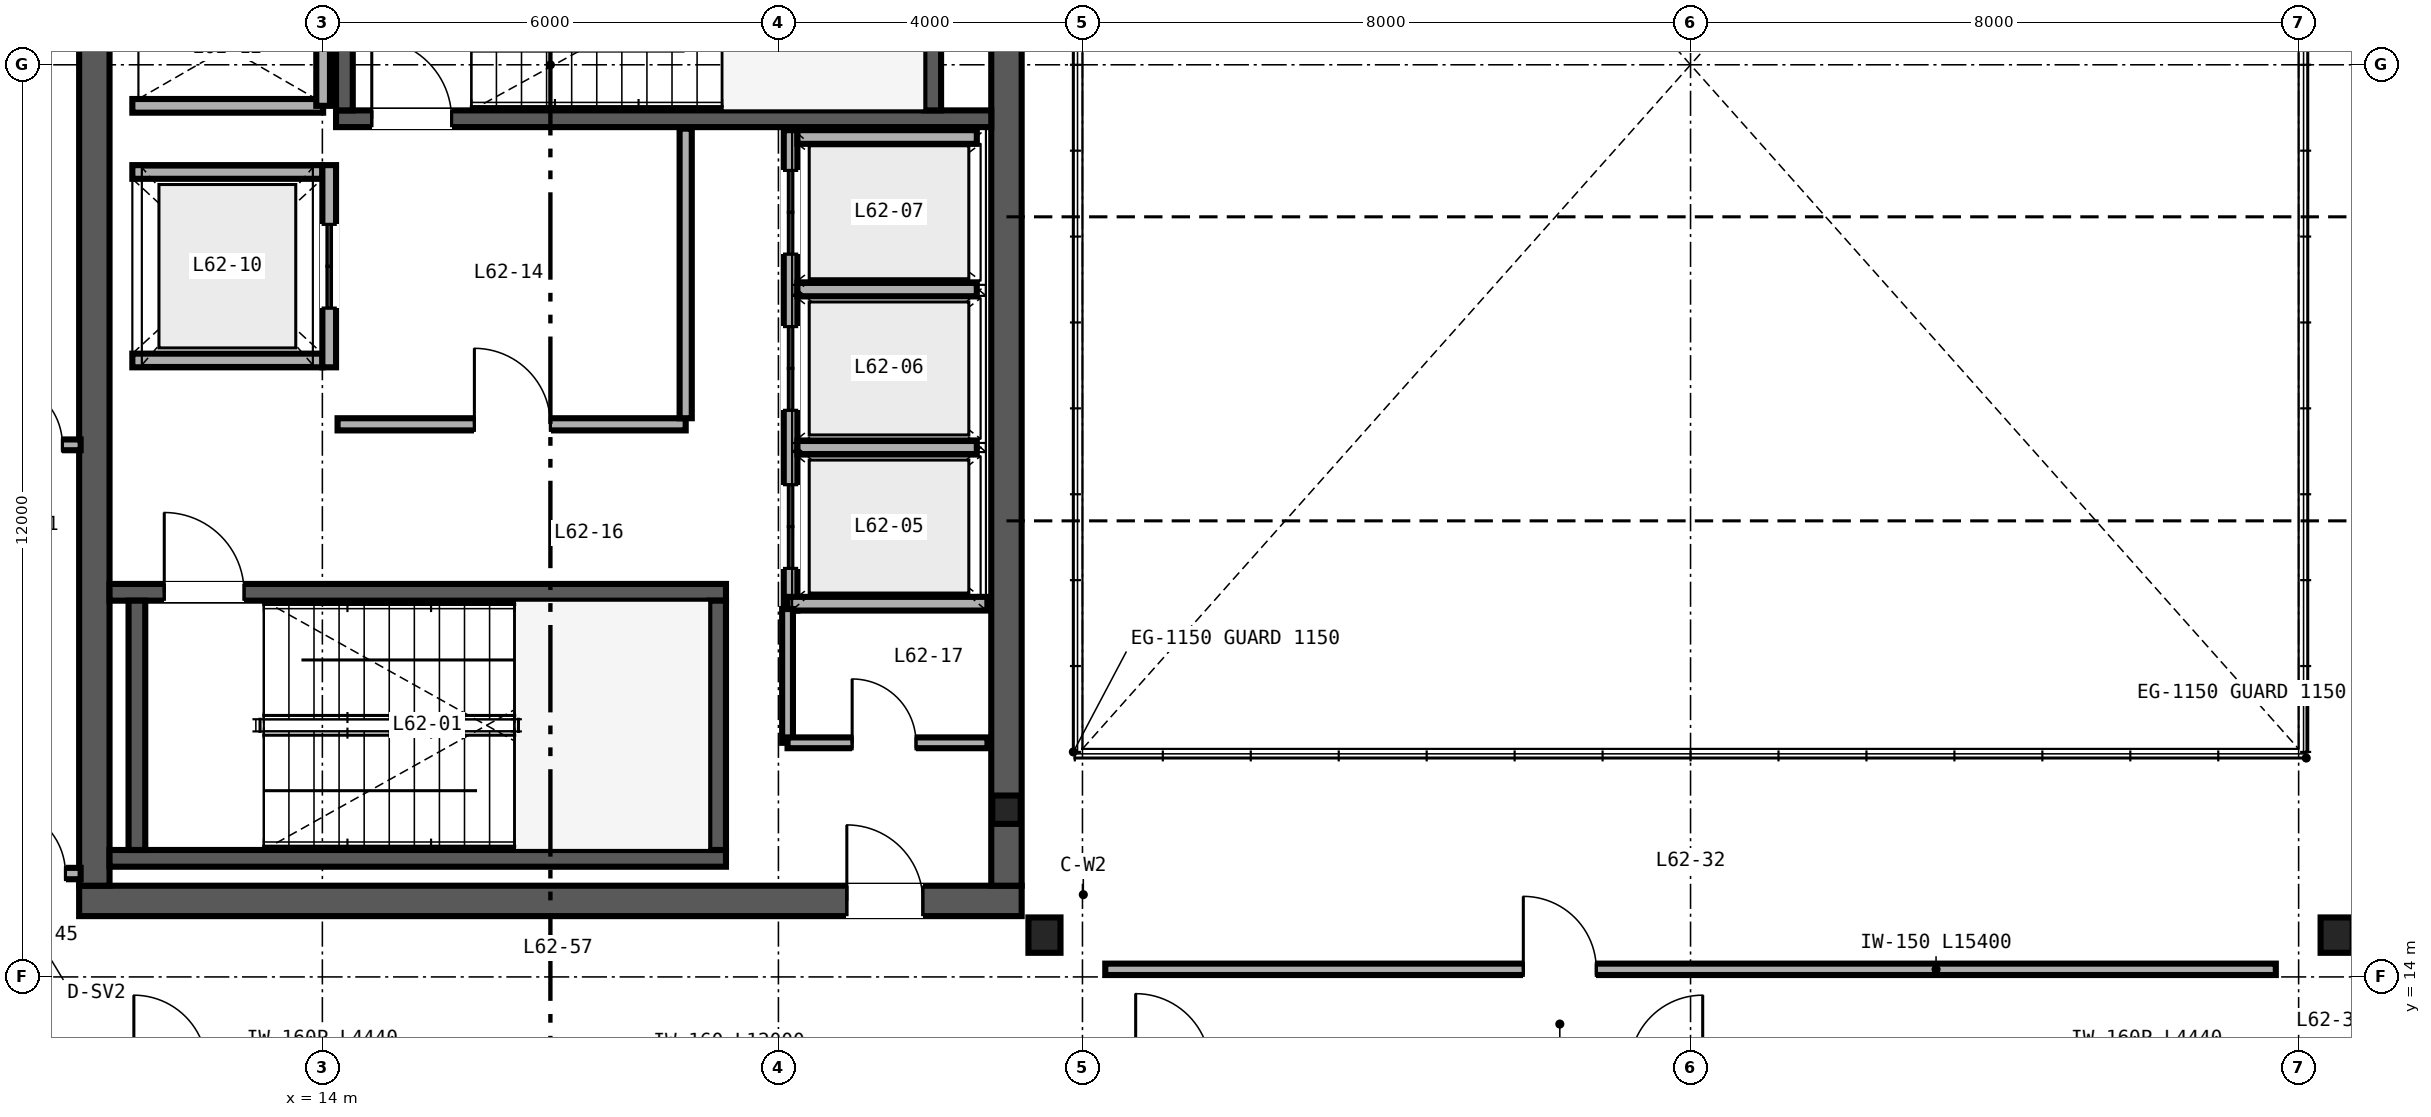
"""IFC4 building model, lengths in metres.
Left out: names, types, materials, properties, quantities, classifications, styles, units other than length and angle.
Written with IfcOpenShell. Run it as: python <this file> out.ifc"""

import sys

from ifc_helpers import new_model, si_unit, direction, frame, frame_2d, origin, origin_2d, place, context, subcontext, project, spatial, rectangle, i_section, extrude, source, transform, mapped, element, fill, save


model = new_model("IFC4")
c1 = context("Model", 3, precision=1e-05, world=origin(), true_north=direction((0.0, 1.0)))
c2 = subcontext(c1, "Body", "Model", "MODEL_VIEW")
j1 = project(units=[si_unit("LENGTHUNIT", "METRE"), si_unit("PLANEANGLEUNIT", "RADIAN")], contexts=[c1])
p1 = place(None, origin())
s1 = spatial("IfcSite", under=j1, at=p1, CompositionType="ELEMENT")
p2 = place(p1, origin())
s2 = spatial("IfcBuilding", under=s1, at=p2, CompositionType="ELEMENT")
p3 = place(p2, frame((0.0, 0.0, 247.2)))
s3 = spatial("IfcBuildingStorey", under=s2, at=p3, CompositionType="ELEMENT", Elevation=247.2)
m1 = source(origin(), c2, "Body", "SweptSolid", [
    extrude(i_section(OverallWidth=0.374, OverallDepth=0.373, WebThickness=0.016, FlangeThickness=0.026, FilletRadius=0.025, at=origin_2d()), origin(), (0.0, 0.0, 1.0), 3.6),
])
p4 = place(p3, frame((23.0, 16.2, 0.0), z_axis=(0.0, 0.0, 1.0), x_axis=(1.0, 0.0, 0.0)))
e1 = element("IfcColumn", 1, at=p4, inside=s3, PredefinedType="COLUMN", context=c2, shape_type="MappedRepresentation", body=[
    mapped(m1, transform((0.0, 0.0, 0.0), scale=1.0)),
])
p5 = place(p3, frame((10.8, 15.0, 0.0), z_axis=(0.0, 0.0, 1.0), x_axis=(1.0, 0.0, 0.0)))
e2 = element("IfcWall", 2, at=p5, inside=s3, PredefinedType="SHEAR", context=c2, shape_type="SweptSolid", body=[
    extrude(rectangle(XDim=12.4, YDim=0.4, at=frame_2d((6.2, 0.0))), origin(), (0.0, 0.0, 1.0), 3.38),
])
p6 = place(p5, frame((10.1, 0.0, 0.0)))
e3 = element("IfcOpeningElement", 3, at=p6, cuts=e2, PredefinedType="OPENING", context=c2, shape_type="SweptSolid", body=[
    extrude(rectangle(XDim=1.0, YDim=2.15, at=frame_2d((0.5, 1.075))), frame((0.0, 0.21, 0.0), z_axis=(0.0, -1.0, 0.0), x_axis=(1.0, 0.0, 0.0)), (0.0, 0.0, 1.0), 0.42),
])
for number, where, z_axis, x_axis in (
    (4, (11.0, 15.2, 0.0), (0.0, 0.0, 1.0), (0.0, 1.0, 0.0)),
    (5, (23.0, 15.2, 0.0), (0.0, 0.0, 1.0), (0.0, 1.0, 0.0)),
):
    element("IfcWall", number, at=place(p3, frame(where, z_axis=z_axis, x_axis=x_axis)), inside=s3, PredefinedType="SHEAR", context=c2, shape_type="SweptSolid", body=[
        extrude(rectangle(XDim=21.6, YDim=0.4, at=frame_2d((10.8, 0.0))), origin(), (0.0, 0.0, 1.0), 3.38),
    ])
p7 = place(p3, frame((11.2, 15.56, 0.0), z_axis=(0.0, 0.0, 1.0), x_axis=(1.0, 0.0, 0.0)))
e6 = element("IfcWall", 6, at=p7, inside=s3, PredefinedType="SHEAR", context=c2, shape_type="SweptSolid", body=[
    extrude(rectangle(XDim=8.11, YDim=0.22, at=frame_2d((4.055, 0.0))), origin(), (0.0, 0.0, 1.0), 3.4),
])
p8 = place(p3, frame((11.2, 19.06, 0.0), z_axis=(0.0, 0.0, 1.0), x_axis=(1.0, 0.0, 0.0)))
e7 = element("IfcWall", 7, at=p8, inside=s3, PredefinedType="SHEAR", context=c2, shape_type="SweptSolid", body=[
    extrude(rectangle(XDim=8.11, YDim=0.22, at=frame_2d((4.055, 0.0))), origin(), (0.0, 0.0, 1.0), 3.4),
])
p9 = place(p8, frame((0.72, 0.0, 0.0)))
e8 = element("IfcOpeningElement", 8, at=p9, cuts=e7, PredefinedType="OPENING", context=c2, shape_type="SweptSolid", body=[
    extrude(rectangle(XDim=1.05, YDim=2.15, at=frame_2d((0.525, 1.075))), frame((0.0, 0.12, 0.0), z_axis=(0.0, -1.0, 0.0), x_axis=(1.0, 0.0, 0.0)), (0.0, 0.0, 1.0), 0.24),
])
for number, where, z_axis, x_axis in (
    (9, (11.56, 15.67, 0.0), (0.0, 0.0, 1.0), (0.0, 1.0, 0.0)),
    (10, (19.2, 15.67, 0.0), (0.0, 0.0, 1.0), (0.0, 1.0, 0.0)),
):
    element("IfcWall", number, at=place(p3, frame(where, z_axis=z_axis, x_axis=x_axis)), inside=s3, PredefinedType="SHEAR", context=c2, shape_type="SweptSolid", body=[
        extrude(rectangle(XDim=3.28, YDim=0.22, at=frame_2d((1.64, 0.0))), origin(), (0.0, 0.0, 1.0), 3.4),
    ])
p10 = place(p3, frame((14.18, 25.29, 0.0), z_axis=(0.0, 0.0, 1.0), x_axis=(1.0, 0.0, 0.0)))
e11 = element("IfcWall", 11, at=p10, inside=s3, PredefinedType="SHEAR", context=c2, shape_type="SweptSolid", body=[
    extrude(rectangle(XDim=8.62, YDim=0.22, at=frame_2d((4.31, 0.0))), origin(), (0.0, 0.0, 1.0), 3.4),
])
p11 = place(p10, frame((0.47, 0.0, 0.0)))
e12 = element("IfcOpeningElement", 12, at=p11, cuts=e11, PredefinedType="OPENING", context=c2, shape_type="SweptSolid", body=[
    extrude(rectangle(XDim=1.05, YDim=2.15, at=frame_2d((0.525, 1.075))), frame((0.0, 0.12, 0.0), z_axis=(0.0, -1.0, 0.0), x_axis=(1.0, 0.0, 0.0)), (0.0, 0.0, 1.0), 0.24),
])
for number, where, z_axis, x_axis in (
    (13, (14.29, 25.4, 0.0), (0.0, 0.0, 1.0), (0.0, 1.0, 0.0)),
    (14, (22.03, 25.4, 0.0), (0.0, 0.0, 1.0), (0.0, 1.0, 0.0)),
):
    element("IfcWall", number, at=place(p3, frame(where, z_axis=z_axis, x_axis=x_axis)), inside=s3, PredefinedType="SHEAR", context=c2, shape_type="SweptSolid", body=[
        extrude(rectangle(XDim=3.28, YDim=0.22, at=frame_2d((1.64, 0.0))), origin(), (0.0, 0.0, 1.0), 3.4),
    ])
m2 = source(origin(), c2, "Body", "SweptSolid", [
    extrude(i_section(OverallWidth=0.422, OverallDepth=0.465, WebThickness=0.045, FlangeThickness=0.073, FilletRadius=0.025, at=origin_2d()), origin(), (0.0, 0.0, 1.0), 3.38),
])
for number, where, z_axis, x_axis in (
    (15, (23.5, 14.55, 0.0), (0.0, 0.0, 1.0), (1.0, 0.0, 0.0)),
    (16, (40.5, 14.55, 0.0), (0.0, 0.0, 1.0), (1.0, 0.0, 0.0)),
):
    element("IfcColumn", number, at=place(p3, frame(where, z_axis=z_axis, x_axis=x_axis)), inside=s3, PredefinedType="COLUMN", context=c2, shape_type="MappedRepresentation", body=[
        mapped(m2, transform((0.0, 0.0, 0.0), scale=1.0)),
    ])
p12 = place(p3, frame((20.16, 18.82, 0.0), z_axis=(0.0, 0.0, 1.0), x_axis=(0.0, 1.0, 0.0)))
e17 = element("IfcWall", 17, at=p12, inside=s3, PredefinedType="SOLIDWALL", context=c2, shape_type="SweptSolid", body=[
    extrude(rectangle(XDim=6.32, YDim=0.18, at=frame_2d((3.16, 0.0))), origin(), (0.0, 0.0, 1.0), 2.48),
])
p13 = place(p12, frame((0.555, 0.0, 0.0)))
e18 = element("IfcOpeningElement", 18, at=p13, cuts=e17, PredefinedType="OPENING", context=c2, shape_type="SweptSolid", body=[
    extrude(rectangle(XDim=1.1, YDim=2.2, at=frame_2d((0.55, 1.1))), frame((0.0, 0.1, 0.0), z_axis=(0.0, -1.0, 0.0), x_axis=(1.0, 0.0, 0.0)), (0.0, 0.0, 1.0), 0.2),
])
p14 = place(p12, frame((2.635, 0.0, 0.0)))
e19 = element("IfcOpeningElement", 19, at=p14, cuts=e17, PredefinedType="OPENING", context=c2, shape_type="SweptSolid", body=[
    extrude(rectangle(XDim=1.1, YDim=2.2, at=frame_2d((0.55, 1.1))), frame((0.0, 0.1, 0.0), z_axis=(0.0, -1.0, 0.0), x_axis=(1.0, 0.0, 0.0)), (0.0, 0.0, 1.0), 0.2),
])
p15 = place(p12, frame((4.69, 0.0, 0.0)))
e20 = element("IfcOpeningElement", 20, at=p15, cuts=e17, PredefinedType="OPENING", context=c2, shape_type="SweptSolid", body=[
    extrude(rectangle(XDim=1.1, YDim=2.2, at=frame_2d((0.55, 1.1))), frame((0.0, 0.1, 0.0), z_axis=(0.0, -1.0, 0.0), x_axis=(1.0, 0.0, 0.0)), (0.0, 0.0, 1.0), 0.2),
])
p16 = place(p3, frame((20.12, 18.91, 0.0), z_axis=(0.0, 0.0, 1.0), x_axis=(1.0, 0.0, 0.0)))
e21 = element("IfcWall", 21, at=p16, inside=s3, PredefinedType="SOLIDWALL", context=c2, shape_type="SweptSolid", body=[
    extrude(rectangle(XDim=2.63, YDim=0.18, at=frame_2d((1.315, 0.0))), origin(), (0.0, 0.0, 1.0), 3.38),
])
p17 = place(p3, frame((20.25, 25.05, 0.0), z_axis=(0.0, 0.0, 1.0), x_axis=(1.0, 0.0, 0.0)))
e22 = element("IfcWall", 22, at=p17, inside=s3, PredefinedType="SOLIDWALL", context=c2, shape_type="SweptSolid", body=[
    extrude(rectangle(XDim=2.36, YDim=0.18, at=frame_2d((1.18, 0.0))), origin(), (0.0, 0.0, 1.0), 3.38),
])
p18 = place(p3, frame((20.25, 20.965, 0.0), z_axis=(0.0, 0.0, 1.0), x_axis=(1.0, 0.0, 0.0)))
e23 = element("IfcWall", 23, at=p18, inside=s3, PredefinedType="SOLIDWALL", context=c2, shape_type="SweptSolid", body=[
    extrude(rectangle(XDim=2.36, YDim=0.18, at=frame_2d((1.18, 0.0))), origin(), (0.0, 0.0, 1.0), 2.48),
])
p19 = place(p3, frame((20.25, 23.045, 0.0), z_axis=(0.0, 0.0, 1.0), x_axis=(1.0, 0.0, 0.0)))
e24 = element("IfcWall", 24, at=p19, inside=s3, PredefinedType="SOLIDWALL", context=c2, shape_type="SweptSolid", body=[
    extrude(rectangle(XDim=2.36, YDim=0.18, at=frame_2d((1.18, 0.0))), origin(), (0.0, 0.0, 1.0), 3.38),
])
for number, where, z_axis, x_axis in (
    (25, (11.5, 22.11, 0.0), (0.0, 0.0, 1.0), (1.0, 0.0, 0.0)),
    (26, (11.5, 24.59, 0.0), (0.0, 0.0, 1.0), (1.0, 0.0, 0.0)),
):
    element("IfcWall", number, at=place(p3, frame(where, z_axis=z_axis, x_axis=x_axis)), inside=s3, PredefinedType="SOLIDWALL", context=c2, shape_type="SweptSolid", body=[
        extrude(rectangle(XDim=2.5, YDim=0.18, at=frame_2d((1.25, 0.0))), origin(), (0.0, 0.0, 1.0), 3.38),
    ])
p20 = place(p3, frame((14.09, 22.02, 0.0), z_axis=(0.0, 0.0, 1.0), x_axis=(0.0, 1.0, 0.0)))
e27 = element("IfcWall", 27, at=p20, inside=s3, PredefinedType="SOLIDWALL", context=c2, shape_type="SweptSolid", body=[
    extrude(rectangle(XDim=2.66, YDim=0.18, at=frame_2d((1.33, 0.0))), origin(), (0.0, 0.0, 1.0), 3.38),
])
p21 = place(p20, frame((0.78, 0.0, 0.0)))
e28 = element("IfcOpeningElement", 28, at=p21, cuts=e27, PredefinedType="OPENING", context=c2, shape_type="SweptSolid", body=[
    extrude(rectangle(XDim=1.1, YDim=2.2, at=frame_2d((0.55, 1.1))), frame((0.0, 0.1, 0.0), z_axis=(0.0, -1.0, 0.0), x_axis=(1.0, 0.0, 0.0)), (0.0, 0.0, 1.0), 0.2),
])
p22 = place(p3, frame((11.5, 25.46, 0.0), z_axis=(0.0, 0.0, 1.0), x_axis=(1.0, 0.0, 0.0)))
e29 = element("IfcWall", 29, at=p22, inside=s3, PredefinedType="SOLIDWALL", context=c2, shape_type="SweptSolid", body=[
    extrude(rectangle(XDim=2.51, YDim=0.18, at=frame_2d((1.255, 0.0))), origin(), (0.0, 0.0, 1.0), 3.38),
])
p23 = place(p3, frame((14.01, 25.46, 0.0), z_axis=(0.0, 0.0, 1.0), x_axis=(0.0, 1.0, 0.0)))
e30 = element("IfcWall", 30, at=p23, inside=s3, PredefinedType="SOLIDWALL", context=c2, shape_type="SweptSolid", body=[
    extrude(rectangle(XDim=3.08, YDim=0.18, at=frame_2d((1.54, 0.0))), origin(), (0.0, 0.0, 1.0), 3.38),
])
p24 = place(p3, frame((14.2, 21.27, 0.0), z_axis=(0.0, 0.0, 1.0), x_axis=(1.0, 0.0, 0.0)))
e31 = element("IfcWall", 31, at=p24, inside=s3, PredefinedType="PARTITIONING", context=c2, shape_type="SweptSolid", body=[
    extrude(rectangle(XDim=4.58, YDim=0.16, at=frame_2d((2.29, 0.0))), origin(), (0.0, 0.0, 1.0), 3.38),
])
p25 = place(p24, frame((1.8, 0.0, 0.0)))
e32 = element("IfcOpeningElement", 32, at=p25, cuts=e31, PredefinedType="OPENING", context=c2, shape_type="SweptSolid", body=[
    extrude(rectangle(XDim=1.0, YDim=2.15, at=frame_2d((0.5, 1.075))), frame((0.0, 0.09, 0.0), z_axis=(0.0, -1.0, 0.0), x_axis=(1.0, 0.0, 0.0)), (0.0, 0.0, 1.0), 0.18),
])
p26 = place(p3, frame((18.78, 21.35, 0.0), z_axis=(0.0, 0.0, 1.0), x_axis=(0.0, 1.0, 0.0)))
e33 = element("IfcWall", 33, at=p26, inside=s3, PredefinedType="PARTITIONING", context=c2, shape_type="SweptSolid", body=[
    extrude(rectangle(XDim=3.81, YDim=0.16, at=frame_2d((1.905, 0.0))), origin(), (0.0, 0.0, 1.0), 3.38),
])
p27 = place(p3, frame((20.12, 17.08, 0.0), z_axis=(0.0, 0.0, 1.0), x_axis=(0.0, 1.0, 0.0)))
e34 = element("IfcWall", 34, at=p27, inside=s3, PredefinedType="PARTITIONING", context=c2, shape_type="SweptSolid", body=[
    extrude(rectangle(XDim=1.76, YDim=0.142, at=frame_2d((0.88, 0.0))), origin(), (0.0, 0.0, 1.0), 3.38),
])
p28 = place(p3, frame((20.12, 17.08, 0.0), z_axis=(0.0, 0.0, 1.0), x_axis=(1.0, 0.0, 0.0)))
e35 = element("IfcWall", 35, at=p28, inside=s3, PredefinedType="PARTITIONING", context=c2, shape_type="SweptSolid", body=[
    extrude(rectangle(XDim=2.63, YDim=0.142, at=frame_2d((1.315, 0.0))), origin(), (0.0, 0.0, 1.0), 3.38),
])
p29 = place(p28, frame((0.85, 0.0, 0.0)))
e36 = element("IfcOpeningElement", 36, at=p29, cuts=e35, PredefinedType="OPENING", context=c2, shape_type="SweptSolid", body=[
    extrude(rectangle(XDim=0.84, YDim=2.1, at=frame_2d((0.42, 1.05))), frame((0.0, 0.081, 0.0), z_axis=(0.0, -1.0, 0.0), x_axis=(1.0, 0.0, 0.0)), (0.0, 0.0, 1.0), 0.162),
])
p30 = place(p3, frame((24.3, 14.1, 0.0), z_axis=(0.0, 0.0, 1.0), x_axis=(1.0, 0.0, 0.0)))
e37 = element("IfcWall", 37, at=p30, inside=s3, PredefinedType="PARTITIONING", context=c2, shape_type="SweptSolid", body=[
    extrude(rectangle(XDim=15.4, YDim=0.15, at=frame_2d((7.7, 0.0))), origin(), (0.0, 0.0, 1.0), 2.923),
])
p31 = place(p30, frame((5.5, 0.0, 0.0)))
e38 = element("IfcOpeningElement", 38, at=p31, cuts=e37, PredefinedType="OPENING", context=c2, shape_type="SweptSolid", body=[
    extrude(rectangle(XDim=0.96, YDim=2.15, at=frame_2d((0.48, 1.075))), frame((0.0, 0.085, 0.0), z_axis=(0.0, -1.0, 0.0), x_axis=(1.0, 0.0, 0.0)), (0.0, 0.0, 1.0), 0.17),
])
p32 = place(p3, frame((8.16, 15.36, 0.0), z_axis=(0.0, 0.0, 1.0), x_axis=(1.0, 0.0, 0.0)))
e39 = element("IfcWall", 39, at=p32, inside=s3, PredefinedType="PARTITIONING", context=c2, shape_type="SweptSolid", body=[
    extrude(rectangle(XDim=2.66, YDim=0.15, at=frame_2d((1.33, 0.0))), origin(), (0.0, 0.0, 1.0), 2.601),
])
p33 = place(p32, frame((1.58, 0.0, 0.0)))
e40 = element("IfcOpeningElement", 40, at=p33, cuts=e39, PredefinedType="OPENING", context=c2, shape_type="SweptSolid", body=[
    extrude(rectangle(XDim=0.88, YDim=2.15, at=frame_2d((0.44, 1.075))), frame((0.0, 0.085, 0.0), z_axis=(0.0, -1.0, 0.0), x_axis=(1.0, 0.0, 0.0)), (0.0, 0.0, 1.0), 0.17),
])
p34 = place(p3, frame((8.16, 21.0, 0.0), z_axis=(0.0, 0.0, 1.0), x_axis=(1.0, 0.0, 0.0)))
e41 = element("IfcWall", 41, at=p34, inside=s3, PredefinedType="PARTITIONING", context=c2, shape_type="SweptSolid", body=[
    extrude(rectangle(XDim=2.66, YDim=0.142, at=frame_2d((1.33, 0.0))), origin(), (0.0, 0.0, 1.0), 2.48),
])
p35 = place(p34, frame((1.58, 0.0, 0.0)))
e42 = element("IfcOpeningElement", 42, at=p35, cuts=e41, PredefinedType="OPENING", context=c2, shape_type="SweptSolid", body=[
    extrude(rectangle(XDim=0.84, YDim=2.1, at=frame_2d((0.42, 1.05))), frame((0.0, 0.081, 0.0), z_axis=(0.0, -1.0, 0.0), x_axis=(1.0, 0.0, 0.0)), (0.0, 0.0, 1.0), 0.162),
])
m3 = source(origin(), c2, "Body", "SweptSolid", [
    extrude(rectangle(XDim=1.05, YDim=2.15, at=frame_2d((0.525, 1.075))), frame((0.0, 0.025, 0.0), z_axis=(0.0, -1.0, 0.0), x_axis=(1.0, 0.0, 0.0)), (0.0, 0.0, 1.0), 0.05),
])
p36 = place(p9, origin())
e43 = element("IfcDoor", 43, at=p36, inside=s3, OperationType="SINGLE_SWING_LEFT", PredefinedType="DOOR", context=c2, shape_type="MappedRepresentation", body=[
    mapped(m3, transform((0.0, 0.0, 0.0), scale=1.0)),
])
fill(e8, e43)
p37 = place(p11, origin())
e44 = element("IfcDoor", 44, at=p37, inside=s3, OperationType="SINGLE_SWING_LEFT", PredefinedType="DOOR", context=c2, shape_type="MappedRepresentation", body=[
    mapped(m3, transform((0.0, 0.0, 0.0), scale=1.0)),
])
fill(e12, e44)
m4 = source(origin(), c2, "Body", "SweptSolid", [
    extrude(rectangle(XDim=1.1, YDim=2.2, at=frame_2d((0.55, 1.1))), frame((0.0, 0.025, 0.0), z_axis=(0.0, -1.0, 0.0), x_axis=(1.0, 0.0, 0.0)), (0.0, 0.0, 1.0), 0.05),
])
p38 = place(p13, origin())
e45 = element("IfcDoor", 45, at=p38, inside=s3, OperationType="DOUBLE_DOOR_SLIDING", PredefinedType="DOOR", context=c2, shape_type="MappedRepresentation", body=[
    mapped(m4, transform((0.0, 0.0, 0.0), scale=1.0)),
])
fill(e18, e45)
p39 = place(p14, origin())
e46 = element("IfcDoor", 46, at=p39, inside=s3, OperationType="DOUBLE_DOOR_SLIDING", PredefinedType="DOOR", context=c2, shape_type="MappedRepresentation", body=[
    mapped(m4, transform((0.0, 0.0, 0.0), scale=1.0)),
])
fill(e19, e46)
p40 = place(p15, origin())
e47 = element("IfcDoor", 47, at=p40, inside=s3, OperationType="DOUBLE_DOOR_SLIDING", PredefinedType="DOOR", context=c2, shape_type="MappedRepresentation", body=[
    mapped(m4, transform((0.0, 0.0, 0.0), scale=1.0)),
])
fill(e20, e47)
p41 = place(p21, origin())
e48 = element("IfcDoor", 48, at=p41, inside=s3, OperationType="DOUBLE_DOOR_SLIDING", PredefinedType="DOOR", context=c2, shape_type="MappedRepresentation", body=[
    mapped(m4, transform((0.0, 0.0, 0.0), scale=1.0)),
])
fill(e28, e48)
m5 = source(origin(), c2, "Body", "SweptSolid", [
    extrude(rectangle(XDim=1.0, YDim=2.15, at=frame_2d((0.5, 1.075))), frame((0.0, 0.025, 0.0), z_axis=(0.0, -1.0, 0.0), x_axis=(1.0, 0.0, 0.0)), (0.0, 0.0, 1.0), 0.05),
])
p42 = place(p25, origin())
e49 = element("IfcDoor", 49, at=p42, inside=s3, OperationType="SINGLE_SWING_LEFT", PredefinedType="DOOR", context=c2, shape_type="MappedRepresentation", body=[
    mapped(m5, transform((0.0, 0.0, 0.0), scale=1.0)),
])
fill(e32, e49)
m6 = source(origin(), c2, "Body", "SweptSolid", [
    extrude(rectangle(XDim=0.84, YDim=2.1, at=frame_2d((0.42, 1.05))), frame((0.0, 0.025, 0.0), z_axis=(0.0, -1.0, 0.0), x_axis=(1.0, 0.0, 0.0)), (0.0, 0.0, 1.0), 0.05),
])
p43 = place(p29, origin())
e50 = element("IfcDoor", 50, at=p43, inside=s3, OperationType="SINGLE_SWING_LEFT", PredefinedType="DOOR", context=c2, shape_type="MappedRepresentation", body=[
    mapped(m6, transform((0.0, 0.0, 0.0), scale=1.0)),
])
fill(e36, e50)
p44 = place(p6, origin())
e51 = element("IfcDoor", 51, at=p44, inside=s3, OperationType="SINGLE_SWING_LEFT", PredefinedType="DOOR", context=c2, shape_type="MappedRepresentation", body=[
    mapped(m5, transform((0.0, 0.0, 0.0), scale=1.0)),
])
fill(e3, e51)
m7 = source(origin(), c2, "Body", "SweptSolid", [
    extrude(rectangle(XDim=0.96, YDim=2.15, at=frame_2d((0.48, 1.075))), frame((0.0, 0.025, 0.0), z_axis=(0.0, -1.0, 0.0), x_axis=(1.0, 0.0, 0.0)), (0.0, 0.0, 1.0), 0.05),
])
p45 = place(p31, origin())
e52 = element("IfcDoor", 52, at=p45, inside=s3, OperationType="SINGLE_SWING_LEFT", PredefinedType="DOOR", context=c2, shape_type="MappedRepresentation", body=[
    mapped(m7, transform((0.0, 0.0, 0.0), scale=1.0)),
])
fill(e38, e52)
m8 = source(origin(), c2, "Body", "SweptSolid", [
    extrude(rectangle(XDim=0.88, YDim=2.15, at=frame_2d((0.44, 1.075))), frame((0.0, 0.025, 0.0), z_axis=(0.0, -1.0, 0.0), x_axis=(1.0, 0.0, 0.0)), (0.0, 0.0, 1.0), 0.05),
])
p46 = place(p33, origin())
e53 = element("IfcDoor", 53, at=p46, inside=s3, OperationType="SINGLE_SWING_LEFT", PredefinedType="DOOR", context=c2, shape_type="MappedRepresentation", body=[
    mapped(m8, transform((0.0, 0.0, 0.0), scale=1.0)),
])
fill(e40, e53)
p47 = place(p35, origin())
e54 = element("IfcDoor", 54, at=p47, inside=s3, OperationType="SINGLE_SWING_LEFT", PredefinedType="DOOR", context=c2, shape_type="MappedRepresentation", body=[
    mapped(m6, transform((0.0, 0.0, 0.0), scale=1.0)),
])
fill(e42, e54)
save(model, sys.argv[1])
